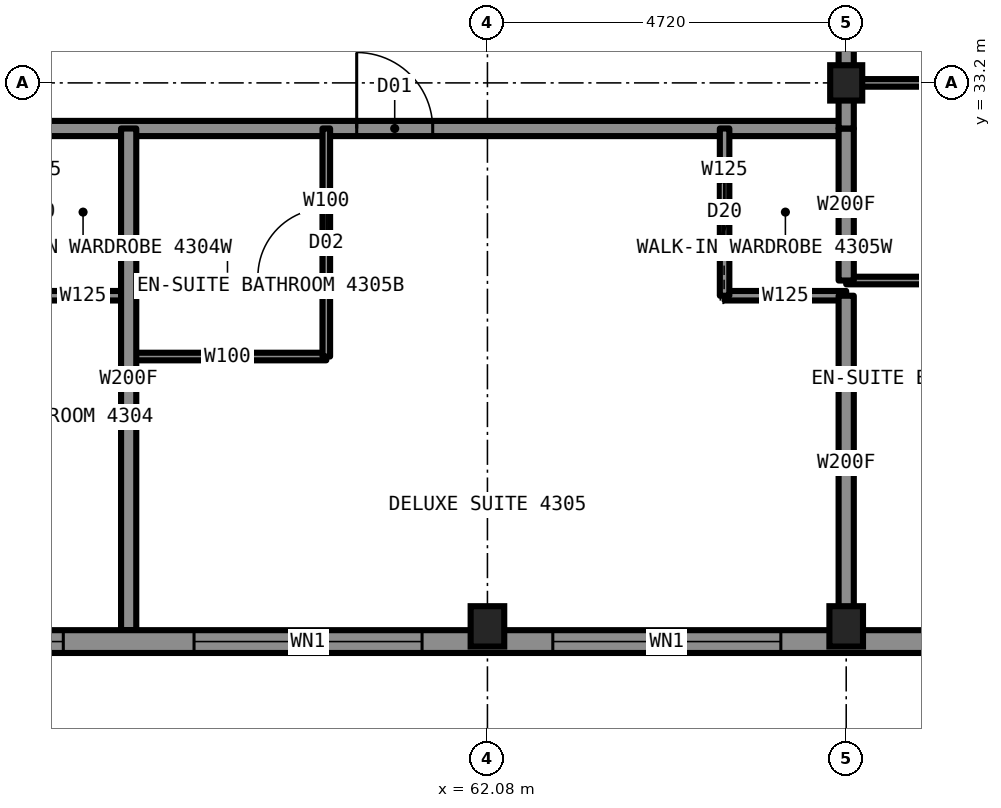
"""IFC4 building model, lengths in metres.
Left out: names, types, materials, properties, quantities, classifications, styles, units other than length and angle.
Written with IfcOpenShell. Run it as: python <this file> out.ifc"""

import sys

from ifc_helpers import new_model, si_unit, direction, frame, frame_2d, origin, origin_2d, place, context, subcontext, project, spatial, rectangle, i_section, extrude, element, fill, save


model = new_model("IFC4")
c1 = context("Model", 3, precision=1e-05, world=origin(), true_north=direction((0.0, 1.0)))
c2 = subcontext(c1, "Body", "Model", "MODEL_VIEW")
j1 = project(units=[si_unit("LENGTHUNIT", "METRE"), si_unit("PLANEANGLEUNIT", "RADIAN")], contexts=[c1])
p1 = place(None, origin())
s1 = spatial("IfcSite", under=j1, at=p1, CompositionType="ELEMENT")
p2 = place(p1, origin())
s2 = spatial("IfcBuilding", under=s1, at=p2, CompositionType="ELEMENT")
p3 = place(p2, frame((0.0, 0.0, 161.8)))
s3 = spatial("IfcBuildingStorey", under=s2, at=p3, CompositionType="ELEMENT", Elevation=161.8)
for number, where, z_axis, x_axis in (
    (1, (62.08, 26.05, 0.0), (0.0, 0.0, 1.0), (1.0, 0.0, 0.0)),
    (2, (66.8, 26.05, 0.0), (0.0, 0.0, 1.0), (1.0, 0.0, 0.0)),
):
    element("IfcColumn", number, at=place(p3, frame(where, z_axis=z_axis, x_axis=x_axis)), inside=s3, PredefinedType="COLUMN", context=c2, shape_type="SweptSolid", body=[
        extrude(i_section(OverallWidth=0.442, OverallDepth=0.531, WebThickness=0.066, FlangeThickness=0.106, at=origin_2d()), origin(), (0.0, 0.0, 1.0), 3.5),
    ])
p4 = place(p3, frame((66.8, 33.2, 0.0), z_axis=(0.0, 0.0, 1.0), x_axis=(1.0, 0.0, 0.0)))
e3 = element("IfcColumn", 3, at=p4, inside=s3, PredefinedType="COLUMN", context=c2, shape_type="SweptSolid", body=[
    extrude(i_section(OverallWidth=0.422, OverallDepth=0.465, WebThickness=0.045, FlangeThickness=0.073, at=origin_2d()), origin(), (0.0, 0.0, 1.0), 3.5),
])
p5 = place(p3, frame((66.8, 33.2, 0.0), z_axis=(0.0, 0.0, 1.0), x_axis=(1.0, 0.0, 0.0)))
e4 = element("IfcWall", 4, at=p5, inside=s3, PredefinedType="PARTITIONING", context=c2, shape_type="SweptSolid", body=[
    extrude(rectangle(XDim=2.6, YDim=0.1, at=frame_2d((1.3, 0.0))), origin(), (0.0, 0.0, 1.0), 2.573),
])
p6 = place(p3, frame((43.2, 32.6, 0.0), z_axis=(0.0, 0.0, 1.0), x_axis=(1.0, 0.0, 0.0)))
e5 = element("IfcWall", 5, at=p6, inside=s3, PredefinedType="PARTITIONING", context=c2, shape_type="SweptSolid", body=[
    extrude(rectangle(XDim=23.6, YDim=0.2, at=frame_2d((11.8, 0.0))), origin(), (0.0, 0.0, 1.0), 3.33),
])
p7 = place(p6, frame((3.0, 0.0, 0.0)))
e6 = element("IfcOpeningElement", 6, at=p7, cuts=e5, PredefinedType="OPENING", context=c2, shape_type="SweptSolid", body=[
    extrude(rectangle(XDim=1.0, YDim=2.2, at=frame_2d((0.5, 1.1))), frame((0.0, 0.11, 0.0), z_axis=(0.0, -1.0, 0.0), x_axis=(1.0, 0.0, 0.0)), (0.0, 0.0, 1.0), 0.22),
])
p8 = place(p6, frame((11.7, 0.0, 0.0)))
e7 = element("IfcOpeningElement", 7, at=p8, cuts=e5, PredefinedType="OPENING", context=c2, shape_type="SweptSolid", body=[
    extrude(rectangle(XDim=1.0, YDim=2.2, at=frame_2d((0.5, 1.1))), frame((0.0, 0.11, 0.0), z_axis=(0.0, -1.0, 0.0), x_axis=(1.0, 0.0, 0.0)), (0.0, 0.0, 1.0), 0.22),
])
p9 = place(p6, frame((17.16, 0.0, 0.0)))
e8 = element("IfcOpeningElement", 8, at=p9, cuts=e5, PredefinedType="OPENING", context=c2, shape_type="SweptSolid", body=[
    extrude(rectangle(XDim=1.0, YDim=2.2, at=frame_2d((0.5, 1.1))), frame((0.0, 0.11, 0.0), z_axis=(0.0, -1.0, 0.0), x_axis=(1.0, 0.0, 0.0)), (0.0, 0.0, 1.0), 0.22),
])
p10 = place(p3, frame((66.8, 30.6, 0.0), z_axis=(0.0, 0.0, 1.0), x_axis=(1.0, 0.0, 0.0)))
e9 = element("IfcWall", 9, at=p10, inside=s3, PredefinedType="PARTITIONING", context=c2, shape_type="SweptSolid", body=[
    extrude(rectangle(XDim=2.6, YDim=0.1, at=frame_2d((1.3, 0.0))), origin(), (0.0, 0.0, 1.0), 3.33),
])
p11 = place(p3, frame((56.16, 30.4, 0.0), z_axis=(0.0, 0.0, 1.0), x_axis=(1.0, 0.0, 0.0)))
e10 = element("IfcWall", 10, at=p11, inside=s3, PredefinedType="PARTITIONING", context=c2, shape_type="SweptSolid", body=[
    extrude(rectangle(XDim=1.2, YDim=0.125, at=frame_2d((0.6, 0.0))), origin(), (0.0, 0.0, 1.0), 3.33),
])
p12 = place(p3, frame((65.2, 30.4, 0.0), z_axis=(0.0, 0.0, 1.0), x_axis=(1.0, 0.0, 0.0)))
e11 = element("IfcWall", 11, at=p12, inside=s3, PredefinedType="PARTITIONING", context=c2, shape_type="SweptSolid", body=[
    extrude(rectangle(XDim=1.6, YDim=0.125, at=frame_2d((0.8, 0.0))), origin(), (0.0, 0.0, 1.0), 3.33),
])
p13 = place(p3, frame((57.36, 29.6, 0.0), z_axis=(0.0, 0.0, 1.0), x_axis=(1.0, 0.0, 0.0)))
e12 = element("IfcWall", 12, at=p13, inside=s3, PredefinedType="PARTITIONING", context=c2, shape_type="SweptSolid", body=[
    extrude(rectangle(XDim=2.6, YDim=0.1, at=frame_2d((1.3, 0.0))), origin(), (0.0, 0.0, 1.0), 3.33),
])
p14 = place(p3, frame((65.2, 30.4, 0.0), z_axis=(0.0, 0.0, 1.0), x_axis=(0.0, 1.0, 0.0)))
e13 = element("IfcWall", 13, at=p14, inside=s3, PredefinedType="PARTITIONING", context=c2, shape_type="SweptSolid", body=[
    extrude(rectangle(XDim=2.2, YDim=0.125, at=frame_2d((1.1, 0.0))), origin(), (0.0, 0.0, 1.0), 3.33),
])
p15 = place(p14, frame((0.7, 0.0, 0.0)))
e14 = element("IfcOpeningElement", 14, at=p15, cuts=e13, PredefinedType="OPENING", context=c2, shape_type="SweptSolid", body=[
    extrude(rectangle(XDim=0.8, YDim=2.1, at=frame_2d((0.4, 1.05))), frame((0.0, 0.073, 0.0), z_axis=(0.0, -1.0, 0.0), x_axis=(1.0, 0.0, 0.0)), (0.0, 0.0, 1.0), 0.145),
])
p16 = place(p3, frame((66.8, 33.22, 0.0), z_axis=(0.0, 0.0, 1.0), x_axis=(0.0, 1.0, 0.0)))
e15 = element("IfcWall", 15, at=p16, inside=s3, PredefinedType="PARTITIONING", context=c2, shape_type="SweptSolid", body=[
    extrude(rectangle(XDim=23.56, YDim=0.2, at=frame_2d((11.78, 0.0))), origin(), (0.0, 0.0, 1.0), 3.33),
])
p17 = place(p16, frame((5.1, 0.0, 0.0)))
e16 = element("IfcOpeningElement", 16, at=p17, cuts=e15, PredefinedType="OPENING", context=c2, shape_type="SweptSolid", body=[
    extrude(rectangle(XDim=1.0, YDim=2.2, at=frame_2d((0.5, 1.1))), frame((0.0, 0.11, 0.0), z_axis=(0.0, -1.0, 0.0), x_axis=(1.0, 0.0, 0.0)), (0.0, 0.0, 1.0), 0.22),
])
p18 = place(p16, frame((12.42, 0.0, 0.0)))
e17 = element("IfcOpeningElement", 17, at=p18, cuts=e15, PredefinedType="OPENING", context=c2, shape_type="SweptSolid", body=[
    extrude(rectangle(XDim=1.0, YDim=2.2, at=frame_2d((0.5, 1.1))), frame((0.0, 0.11, 0.0), z_axis=(0.0, -1.0, 0.0), x_axis=(1.0, 0.0, 0.0)), (0.0, 0.0, 1.0), 0.22),
])
p19 = place(p16, frame((22.03, 0.0, 0.0)))
e18 = element("IfcOpeningElement", 18, at=p19, cuts=e15, PredefinedType="OPENING", context=c2, shape_type="SweptSolid", body=[
    extrude(rectangle(XDim=1.1, YDim=2.2, at=frame_2d((0.55, 1.1))), frame((0.0, 0.11, 0.0), z_axis=(0.0, -1.0, 0.0), x_axis=(1.0, 0.0, 0.0)), (0.0, 0.0, 1.0), 0.22),
])
p20 = place(p16, frame((0.63, 0.0, 0.0)))
e19 = element("IfcOpeningElement", 19, at=p20, cuts=e15, PredefinedType="OPENING", context=c2, shape_type="SweptSolid", body=[
    extrude(rectangle(XDim=1.1, YDim=2.2, at=frame_2d((0.55, 1.1))), frame((0.0, 0.11, 0.0), z_axis=(0.0, -1.0, 0.0), x_axis=(1.0, 0.0, 0.0)), (0.0, 0.0, 1.0), 0.22),
])
p21 = place(p3, frame((66.8, 26.0, 0.0), z_axis=(0.0, 0.0, 1.0), x_axis=(0.0, 1.0, 0.0)))
e20 = element("IfcWall", 20, at=p21, inside=s3, PredefinedType="PARTITIONING", context=c2, shape_type="SweptSolid", body=[
    extrude(rectangle(XDim=4.4, YDim=0.2, at=frame_2d((2.2, 0.0))), origin(), (0.0, 0.0, 1.0), 2.573),
])
p22 = place(p3, frame((66.8, 30.6, 0.0), z_axis=(0.0, 0.0, 1.0), x_axis=(0.0, 1.0, 0.0)))
e21 = element("IfcWall", 21, at=p22, inside=s3, PredefinedType="PARTITIONING", context=c2, shape_type="SweptSolid", body=[
    extrude(rectangle(XDim=2.0, YDim=0.2, at=frame_2d((1.0, 0.0))), origin(), (0.0, 0.0, 1.0), 2.573),
])
p23 = place(p3, frame((57.36, 26.0, 0.0), z_axis=(0.0, 0.0, 1.0), x_axis=(0.0, 1.0, 0.0)))
e22 = element("IfcWall", 22, at=p23, inside=s3, PredefinedType="PARTITIONING", context=c2, shape_type="SweptSolid", body=[
    extrude(rectangle(XDim=6.6, YDim=0.2, at=frame_2d((3.3, 0.0))), origin(), (0.0, 0.0, 1.0), 3.33),
])
p24 = place(p3, frame((59.96, 29.6, 0.0), z_axis=(0.0, 0.0, 1.0), x_axis=(0.0, 1.0, 0.0)))
e23 = element("IfcWall", 23, at=p24, inside=s3, PredefinedType="PARTITIONING", context=c2, shape_type="SweptSolid", body=[
    extrude(rectangle(XDim=3.0, YDim=0.1, at=frame_2d((1.5, 0.0))), origin(), (0.0, 0.0, 1.0), 3.33),
])
p25 = place(p24, frame((1.05, 0.0, 0.0)))
e24 = element("IfcOpeningElement", 24, at=p25, cuts=e23, PredefinedType="OPENING", context=c2, shape_type="SweptSolid", body=[
    extrude(rectangle(XDim=0.9, YDim=2.1, at=frame_2d((0.45, 1.05))), frame((0.0, 0.06, 0.0), z_axis=(0.0, -1.0, 0.0), x_axis=(1.0, 0.0, 0.0)), (0.0, 0.0, 1.0), 0.12),
])
p26 = place(p3, frame((41.2, 25.85, 0.0), z_axis=(0.0, 0.0, 1.0), x_axis=(1.0, 0.0, 0.0)))
e25 = element("IfcWall", 25, at=p26, inside=s3, PredefinedType="SOLIDWALL", context=c2, shape_type="SweptSolid", body=[
    extrude(rectangle(XDim=27.6, YDim=0.3, at=frame_2d((13.8, 0.0))), origin(), (0.0, 0.0, 1.0), 2.83),
])
p27 = place(p26, frame((2.86, 0.0, 0.3)))
e26 = element("IfcOpeningElement", 26, at=p27, cuts=e25, PredefinedType="OPENING", context=c2, shape_type="SweptSolid", body=[
    extrude(rectangle(XDim=3.0, YDim=2.0, at=frame_2d((1.5, 1.0))), frame((0.0, 0.16, 0.0), z_axis=(0.0, -1.0, 0.0), x_axis=(1.0, 0.0, 0.0)), (0.0, 0.0, 1.0), 0.32),
])
p28 = place(p26, frame((7.58, 0.0, 0.3)))
e27 = element("IfcOpeningElement", 27, at=p28, cuts=e25, PredefinedType="OPENING", context=c2, shape_type="SweptSolid", body=[
    extrude(rectangle(XDim=3.0, YDim=2.0, at=frame_2d((1.5, 1.0))), frame((0.0, 0.16, 0.0), z_axis=(0.0, -1.0, 0.0), x_axis=(1.0, 0.0, 0.0)), (0.0, 0.0, 1.0), 0.32),
])
p29 = place(p26, frame((12.3, 0.0, 0.3)))
e28 = element("IfcOpeningElement", 28, at=p29, cuts=e25, PredefinedType="OPENING", context=c2, shape_type="SweptSolid", body=[
    extrude(rectangle(XDim=3.0, YDim=2.0, at=frame_2d((1.5, 1.0))), frame((0.0, 0.16, 0.0), z_axis=(0.0, -1.0, 0.0), x_axis=(1.0, 0.0, 0.0)), (0.0, 0.0, 1.0), 0.32),
])
p30 = place(p26, frame((17.02, 0.0, 0.3)))
e29 = element("IfcOpeningElement", 29, at=p30, cuts=e25, PredefinedType="OPENING", context=c2, shape_type="SweptSolid", body=[
    extrude(rectangle(XDim=3.0, YDim=2.0, at=frame_2d((1.5, 1.0))), frame((0.0, 0.16, 0.0), z_axis=(0.0, -1.0, 0.0), x_axis=(1.0, 0.0, 0.0)), (0.0, 0.0, 1.0), 0.32),
])
p31 = place(p26, frame((21.74, 0.0, 0.3)))
e30 = element("IfcOpeningElement", 30, at=p31, cuts=e25, PredefinedType="OPENING", context=c2, shape_type="SweptSolid", body=[
    extrude(rectangle(XDim=3.0, YDim=2.0, at=frame_2d((1.5, 1.0))), frame((0.0, 0.16, 0.0), z_axis=(0.0, -1.0, 0.0), x_axis=(1.0, 0.0, 0.0)), (0.0, 0.0, 1.0), 0.32),
])
p32 = place(p3, frame((66.8, 32.6, 0.0), z_axis=(0.0, 0.0, 1.0), x_axis=(0.0, 1.0, 0.0)))
e31 = element("IfcWall", 31, at=p32, inside=s3, PredefinedType="PARTITIONING", context=c2, shape_type="SweptSolid", body=[
    extrude(rectangle(XDim=0.62, YDim=0.2, at=frame_2d((0.31, 0.0))), origin(), (0.0, 0.0, 1.0), 2.573),
])
p33 = place(p9, origin())
e32 = element("IfcDoor", 32, at=p33, inside=s3, OperationType="SINGLE_SWING_LEFT", PredefinedType="DOOR", context=c2, shape_type="SweptSolid", body=[
    extrude(rectangle(XDim=1.0, YDim=2.2, at=frame_2d((0.5, 1.1))), frame((0.0, 0.025, 0.0), z_axis=(0.0, -1.0, 0.0), x_axis=(1.0, 0.0, 0.0)), (0.0, 0.0, 1.0), 0.05),
])
fill(e8, e32)
p34 = place(p25, origin())
e33 = element("IfcDoor", 33, at=p34, inside=s3, OperationType="SINGLE_SWING_RIGHT", PredefinedType="DOOR", context=c2, shape_type="SweptSolid", body=[
    extrude(rectangle(XDim=0.9, YDim=2.1, at=frame_2d((0.45, 1.05))), frame((0.0, 0.025, 0.0), z_axis=(0.0, -1.0, 0.0), x_axis=(1.0, 0.0, 0.0)), (0.0, 0.0, 1.0), 0.05),
])
fill(e24, e33)
p35 = place(p15, origin())
e34 = element("IfcDoor", 34, at=p35, inside=s3, OperationType="SLIDING_TO_LEFT", PredefinedType="DOOR", context=c2, shape_type="SweptSolid", body=[
    extrude(rectangle(XDim=0.8, YDim=2.1, at=frame_2d((0.4, 1.05))), frame((0.0, 0.025, 0.0), z_axis=(0.0, -1.0, 0.0), x_axis=(1.0, 0.0, 0.0)), (0.0, 0.0, 1.0), 0.05),
])
fill(e14, e34)
p36 = place(p29, origin())
e35 = element("IfcWindow", 35, at=p36, inside=s3, PartitioningType="SINGLE_PANEL", PredefinedType="WINDOW", context=c2, shape_type="SweptSolid", body=[
    extrude(rectangle(XDim=3.0, YDim=2.0, at=frame_2d((1.5, 1.0))), frame((0.0, 0.13, 0.0), z_axis=(0.0, -1.0, 0.0), x_axis=(1.0, 0.0, 0.0)), (0.0, 0.0, 1.0), 0.06),
])
fill(e28, e35)
p37 = place(p30, origin())
e36 = element("IfcWindow", 36, at=p37, inside=s3, PartitioningType="SINGLE_PANEL", PredefinedType="WINDOW", context=c2, shape_type="SweptSolid", body=[
    extrude(rectangle(XDim=3.0, YDim=2.0, at=frame_2d((1.5, 1.0))), frame((0.0, 0.13, 0.0), z_axis=(0.0, -1.0, 0.0), x_axis=(1.0, 0.0, 0.0)), (0.0, 0.0, 1.0), 0.06),
])
fill(e29, e36)
p38 = place(p31, origin())
e37 = element("IfcWindow", 37, at=p38, inside=s3, PartitioningType="SINGLE_PANEL", PredefinedType="WINDOW", context=c2, shape_type="SweptSolid", body=[
    extrude(rectangle(XDim=3.0, YDim=2.0, at=frame_2d((1.5, 1.0))), frame((0.0, 0.13, 0.0), z_axis=(0.0, -1.0, 0.0), x_axis=(1.0, 0.0, 0.0)), (0.0, 0.0, 1.0), 0.06),
])
fill(e30, e37)
save(model, sys.argv[1])
